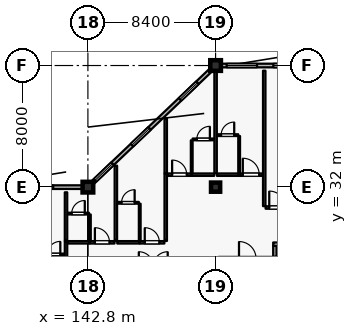
"""IFC4 building model, lengths in metres.
Left out: names, types, materials, properties, quantities, classifications, styles, units other than length and angle.
Written with IfcOpenShell. Run it as: python <this file> out.ifc"""

import sys

from ifc_helpers import new_model, si_unit, direction, frame, frame_2d, origin, origin_2d, place, context, subcontext, project, spatial, rectangle, extrude, element, fill, save


model = new_model("IFC4")
c1 = context("Model", 3, precision=1e-05, world=origin(), true_north=direction((0.0, 1.0)))
c2 = subcontext(c1, "Body", "Model", "MODEL_VIEW")
j1 = project(units=[si_unit("LENGTHUNIT", "METRE"), si_unit("PLANEANGLEUNIT", "RADIAN")], contexts=[c1])
p1 = place(None, origin())
s1 = spatial("IfcSite", under=j1, at=p1, CompositionType="ELEMENT")
p2 = place(p1, origin())
s2 = spatial("IfcBuilding", under=s1, at=p2, CompositionType="ELEMENT")
p3 = place(p2, frame((0.0, 0.0, 36.0)))
s3 = spatial("IfcBuildingStorey", under=s2, at=p3, CompositionType="ELEMENT", Elevation=36.0)
for number, where, z_axis, x_axis in (
    (1, (142.8, 32.0, 0.0), (0.0, 0.0, 1.0), (1.0, 0.0, 0.0)),
    (2, (151.2, 40.0, 0.0), (0.0, 0.0, 1.0), (1.0, 0.0, 0.0)),
):
    element("IfcColumn", number, at=place(p3, frame(where, z_axis=z_axis, x_axis=x_axis)), inside=s3, PredefinedType="COLUMN", context=c2, shape_type="SweptSolid", body=[
        extrude(rectangle(XDim=0.7, YDim=0.7, at=origin_2d()), origin(), (0.0, 0.0, 1.0), 3.6),
    ])
p4 = place(p3, frame((151.2, 32.0, 0.0), z_axis=(0.0, 0.0, 1.0), x_axis=(1.0, 0.0, 0.0)))
e3 = element("IfcColumn", 3, at=p4, inside=s3, PredefinedType="COLUMN", context=c2, shape_type="SweptSolid", body=[
    extrude(rectangle(XDim=0.6, YDim=0.6, at=origin_2d()), origin(), (0.0, 0.0, 1.0), 3.6),
])
p5 = place(p3, frame((134.75, 32.0, 0.0), z_axis=(0.0, 0.0, 1.0), x_axis=(1.0, 0.0, 0.0)))
e4 = element("IfcWall", 4, at=p5, inside=s3, PredefinedType="SOLIDWALL", context=c2, shape_type="SweptSolid", body=[
    extrude(rectangle(XDim=7.7, YDim=0.24, at=frame_2d((3.85, 0.0))), origin(), (0.0, 0.0, 1.0), 2.94),
])
p6 = place(p5, frame((0.89, 0.0, 0.8)))
e5 = element("IfcOpeningElement", 5, at=p6, cuts=e4, PredefinedType="OPENING", context=c2, shape_type="SweptSolid", body=[
    extrude(rectangle(XDim=1.6, YDim=1.6, at=frame_2d((0.8, 0.8))), frame((0.0, 0.13, 0.0), z_axis=(0.0, -1.0, 0.0), x_axis=(1.0, 0.0, 0.0)), (0.0, 0.0, 1.0), 0.26),
])
p7 = place(p5, frame((4.17, 0.0, 0.8)))
e6 = element("IfcOpeningElement", 6, at=p7, cuts=e4, PredefinedType="OPENING", context=c2, shape_type="SweptSolid", body=[
    extrude(rectangle(XDim=1.6, YDim=1.6, at=frame_2d((0.8, 0.8))), frame((0.0, 0.13, 0.0), z_axis=(0.0, -1.0, 0.0), x_axis=(1.0, 0.0, 0.0)), (0.0, 0.0, 1.0), 0.26),
])
p8 = place(p3, frame((143.15, 32.333, 0.0), z_axis=(0.0, 0.0, 1.0), x_axis=(0.724116091282, 0.689678103427, 0.0)))
e7 = element("IfcWall", 7, at=p8, inside=s3, PredefinedType="SOLIDWALL", context=c2, shape_type="SweptSolid", body=[
    extrude(rectangle(XDim=10.634, YDim=0.24, at=frame_2d((5.317, 0.0))), origin(), (0.0, 0.0, 1.0), 2.94),
])
p9 = place(p8, frame((0.16, 0.0, 0.8)))
e8 = element("IfcOpeningElement", 8, at=p9, cuts=e7, PredefinedType="OPENING", context=c2, shape_type="SweptSolid", body=[
    extrude(rectangle(XDim=1.6, YDim=1.6, at=frame_2d((0.8, 0.8))), frame((0.0, 0.13, 0.0), z_axis=(0.0, -1.0, 0.0), x_axis=(1.0, 0.0, 0.0)), (0.0, 0.0, 1.0), 0.26),
])
p10 = place(p8, frame((3.523, 0.0, 0.8)))
e9 = element("IfcOpeningElement", 9, at=p10, cuts=e7, PredefinedType="OPENING", context=c2, shape_type="SweptSolid", body=[
    extrude(rectangle(XDim=1.6, YDim=1.6, at=frame_2d((0.8, 0.8))), frame((0.0, 0.13, 0.0), z_axis=(0.0, -1.0, 0.0), x_axis=(1.0, 0.0, 0.0)), (0.0, 0.0, 1.0), 0.26),
])
p11 = place(p8, frame((7.88, 0.0, 0.8)))
e10 = element("IfcOpeningElement", 10, at=p11, cuts=e7, PredefinedType="OPENING", context=c2, shape_type="SweptSolid", body=[
    extrude(rectangle(XDim=1.6, YDim=1.6, at=frame_2d((0.8, 0.8))), frame((0.0, 0.13, 0.0), z_axis=(0.0, -1.0, 0.0), x_axis=(1.0, 0.0, 0.0)), (0.0, 0.0, 1.0), 0.26),
])
p12 = place(p3, frame((151.55, 40.0, 0.0), z_axis=(0.0, 0.0, 1.0), x_axis=(1.0, 0.0, 0.0)))
e11 = element("IfcWall", 11, at=p12, inside=s3, PredefinedType="SOLIDWALL", context=c2, shape_type="SweptSolid", body=[
    extrude(rectangle(XDim=7.7, YDim=0.24, at=frame_2d((3.85, 0.0))), origin(), (0.0, 0.0, 1.0), 2.94),
])
p13 = place(p12, frame((0.375, 0.0, 0.8)))
e12 = element("IfcOpeningElement", 12, at=p13, cuts=e11, PredefinedType="OPENING", context=c2, shape_type="SweptSolid", body=[
    extrude(rectangle(XDim=2.0, YDim=1.75, at=frame_2d((1.0, 0.875))), frame((0.0, 0.13, 0.0), z_axis=(0.0, -1.0, 0.0), x_axis=(1.0, 0.0, 0.0)), (0.0, 0.0, 1.0), 0.26),
])
p14 = place(p12, frame((3.45, 0.0, 0.8)))
e13 = element("IfcOpeningElement", 13, at=p14, cuts=e11, PredefinedType="OPENING", context=c2, shape_type="SweptSolid", body=[
    extrude(rectangle(XDim=2.0, YDim=1.75, at=frame_2d((1.0, 0.875))), frame((0.0, 0.13, 0.0), z_axis=(0.0, -1.0, 0.0), x_axis=(1.0, 0.0, 0.0)), (0.0, 0.0, 1.0), 0.26),
])
p15 = place(p12, frame((6.325, 0.0, 0.8)))
e14 = element("IfcOpeningElement", 14, at=p15, cuts=e11, PredefinedType="OPENING", context=c2, shape_type="SweptSolid", body=[
    extrude(rectangle(XDim=1.2, YDim=1.5, at=frame_2d((0.6, 0.75))), frame((0.0, 0.13, 0.0), z_axis=(0.0, -1.0, 0.0), x_axis=(1.0, 0.0, 0.0)), (0.0, 0.0, 1.0), 0.26),
])
p16 = place(p3, frame((155.1, 27.415, 0.0), z_axis=(0.0, 0.0, 1.0), x_axis=(0.0, 1.0, 0.0)))
e15 = element("IfcWall", 15, at=p16, inside=s3, PredefinedType="PARTITIONING", context=c2, shape_type="SweptSolid", body=[
    extrude(rectangle(XDim=0.72, YDim=0.22, at=frame_2d((0.36, 0.0))), origin(), (0.0, 0.0, 1.0), 3.365),
])
p17 = place(p3, frame((154.99, 28.25, 0.0), z_axis=(0.0, 0.0, 1.0), x_axis=(1.0, 0.0, 0.0)))
e16 = element("IfcWall", 16, at=p17, inside=s3, PredefinedType="PARTITIONING", context=c2, shape_type="SweptSolid", body=[
    extrude(rectangle(XDim=4.02, YDim=0.22, at=frame_2d((2.01, 0.0))), origin(), (0.0, 0.0, 1.0), 3.365),
])
p18 = place(p17, frame((1.39, 0.0, 0.0)))
e17 = element("IfcOpeningElement", 17, at=p18, cuts=e16, PredefinedType="OPENING", context=c2, shape_type="SweptSolid", body=[
    extrude(rectangle(XDim=1.24, YDim=2.2, at=frame_2d((0.62, 1.1))), frame((0.0, 0.12, 0.0), z_axis=(0.0, -1.0, 0.0), x_axis=(1.0, 0.0, 0.0)), (0.0, 0.0, 1.0), 0.24),
])
p19 = place(p3, frame((139.85, 27.57, 0.0), z_axis=(0.0, 0.0, 1.0), x_axis=(1.0, 0.0, 0.0)))
e18 = element("IfcWall", 18, at=p19, inside=s3, PredefinedType="PARTITIONING", context=c2, shape_type="SweptSolid", body=[
    extrude(rectangle(XDim=1.41, YDim=0.115, at=frame_2d((0.705, 0.0))), origin(), (0.0, 0.0, 1.0), 3.365),
])
p20 = place(p19, frame((0.275, 0.0, 0.0)))
e19 = element("IfcOpeningElement", 19, at=p20, cuts=e18, PredefinedType="OPENING", context=c2, shape_type="SweptSolid", body=[
    extrude(rectangle(XDim=0.86, YDim=2.12, at=frame_2d((0.43, 1.06))), frame((0.0, 0.067, 0.0), z_axis=(0.0, -1.0, 0.0), x_axis=(1.0, 0.0, 0.0)), (0.0, 0.0, 1.0), 0.135),
])
p21 = place(p3, frame((141.36, 25.06, 0.0), z_axis=(0.0, 0.0, 1.0), x_axis=(0.0, 1.0, 0.0)))
e20 = element("IfcWall", 20, at=p21, inside=s3, PredefinedType="PARTITIONING", context=c2, shape_type="SweptSolid", body=[
    extrude(rectangle(XDim=3.39, YDim=0.16, at=frame_2d((1.695, 0.0))), origin(), (0.0, 0.0, 1.0), 3.365),
])
p22 = place(p3, frame((141.45, 28.37, 0.0), z_axis=(0.0, 0.0, 1.0), x_axis=(1.0, 0.0, 0.0)))
e21 = element("IfcWall", 21, at=p22, inside=s3, PredefinedType="PARTITIONING", context=c2, shape_type="SweptSolid", body=[
    extrude(rectangle(XDim=1.47, YDim=0.16, at=frame_2d((0.735, 0.0))), origin(), (0.0, 0.0, 1.0), 3.365),
])
p23 = place(p3, frame((142.93, 28.37, 0.0), z_axis=(0.0, 0.0, 1.0), x_axis=(1.0, 0.0, 0.0)))
e22 = element("IfcWall", 22, at=p23, inside=s3, PredefinedType="PARTITIONING", context=c2, shape_type="SweptSolid", body=[
    extrude(rectangle(XDim=1.62, YDim=0.16, at=frame_2d((0.81, 0.0))), origin(), (0.0, 0.0, 1.0), 3.365),
])
p24 = place(p23, frame((0.33, 0.0, 0.0)))
e23 = element("IfcOpeningElement", 23, at=p24, cuts=e22, PredefinedType="OPENING", context=c2, shape_type="SweptSolid", body=[
    extrude(rectangle(XDim=0.96, YDim=2.2, at=frame_2d((0.48, 1.1))), frame((0.0, 0.09, 0.0), z_axis=(0.0, -1.0, 0.0), x_axis=(1.0, 0.0, 0.0)), (0.0, 0.0, 1.0), 0.18),
])
p25 = place(p3, frame((142.93, 28.46, 0.0), z_axis=(0.0, 0.0, 1.0), x_axis=(0.0, 1.0, 0.0)))
e24 = element("IfcWall", 24, at=p25, inside=s3, PredefinedType="PARTITIONING", context=c2, shape_type="SweptSolid", body=[
    extrude(rectangle(XDim=1.74, YDim=0.115, at=frame_2d((0.87, 0.0))), origin(), (0.0, 0.0, 1.0), 2.74),
])
p26 = place(p3, frame((141.46, 30.26, 0.0), z_axis=(0.0, 0.0, 1.0), x_axis=(1.0, 0.0, 0.0)))
e25 = element("IfcWall", 25, at=p26, inside=s3, PredefinedType="PARTITIONING", context=c2, shape_type="SweptSolid", body=[
    extrude(rectangle(XDim=1.41, YDim=0.115, at=frame_2d((0.705, 0.0))), origin(), (0.0, 0.0, 1.0), 3.365),
])
p27 = place(p26, frame((0.275, 0.0, 0.0)))
e26 = element("IfcOpeningElement", 26, at=p27, cuts=e25, PredefinedType="OPENING", context=c2, shape_type="SweptSolid", body=[
    extrude(rectangle(XDim=0.86, YDim=2.12, at=frame_2d((0.43, 1.06))), frame((0.0, 0.067, 0.0), z_axis=(0.0, -1.0, 0.0), x_axis=(1.0, 0.0, 0.0)), (0.0, 0.0, 1.0), 0.135),
])
p28 = place(p3, frame((141.36, 28.46, 0.0), z_axis=(0.0, 0.0, 1.0), x_axis=(0.0, 1.0, 0.0)))
e27 = element("IfcWall", 27, at=p28, inside=s3, PredefinedType="PARTITIONING", context=c2, shape_type="SweptSolid", body=[
    extrude(rectangle(XDim=3.2, YDim=0.16, at=frame_2d((1.6, 0.0))), origin(), (0.0, 0.0, 1.0), 3.365),
])
p29 = place(p3, frame((144.73, 28.37, 0.0), z_axis=(0.0, 0.0, 1.0), x_axis=(1.0, 0.0, 0.0)))
e28 = element("IfcWall", 28, at=p29, inside=s3, PredefinedType="PARTITIONING", context=c2, shape_type="SweptSolid", body=[
    extrude(rectangle(XDim=1.47, YDim=0.16, at=frame_2d((0.735, 0.0))), origin(), (0.0, 0.0, 1.0), 3.365),
])
p30 = place(p3, frame((146.21, 28.37, 0.0), z_axis=(0.0, 0.0, 1.0), x_axis=(1.0, 0.0, 0.0)))
e29 = element("IfcWall", 29, at=p30, inside=s3, PredefinedType="PARTITIONING", context=c2, shape_type="SweptSolid", body=[
    extrude(rectangle(XDim=1.62, YDim=0.16, at=frame_2d((0.81, 0.0))), origin(), (0.0, 0.0, 1.0), 3.365),
])
p31 = place(p30, frame((0.33, 0.0, 0.0)))
e30 = element("IfcOpeningElement", 30, at=p31, cuts=e29, PredefinedType="OPENING", context=c2, shape_type="SweptSolid", body=[
    extrude(rectangle(XDim=0.96, YDim=2.2, at=frame_2d((0.48, 1.1))), frame((0.0, 0.09, 0.0), z_axis=(0.0, -1.0, 0.0), x_axis=(1.0, 0.0, 0.0)), (0.0, 0.0, 1.0), 0.18),
])
p32 = place(p3, frame((146.21, 28.46, 0.0), z_axis=(0.0, 0.0, 1.0), x_axis=(0.0, 1.0, 0.0)))
e31 = element("IfcWall", 31, at=p32, inside=s3, PredefinedType="PARTITIONING", context=c2, shape_type="SweptSolid", body=[
    extrude(rectangle(XDim=2.45, YDim=0.115, at=frame_2d((1.225, 0.0))), origin(), (0.0, 0.0, 1.0), 3.365),
])
p33 = place(p3, frame((144.74, 30.97, 0.0), z_axis=(0.0, 0.0, 1.0), x_axis=(1.0, 0.0, 0.0)))
e32 = element("IfcWall", 32, at=p33, inside=s3, PredefinedType="PARTITIONING", context=c2, shape_type="SweptSolid", body=[
    extrude(rectangle(XDim=1.41, YDim=0.115, at=frame_2d((0.705, 0.0))), origin(), (0.0, 0.0, 1.0), 3.365),
])
p34 = place(p33, frame((0.275, 0.0, 0.0)))
e33 = element("IfcOpeningElement", 33, at=p34, cuts=e32, PredefinedType="OPENING", context=c2, shape_type="SweptSolid", body=[
    extrude(rectangle(XDim=0.86, YDim=2.12, at=frame_2d((0.43, 1.06))), frame((0.0, 0.067, 0.0), z_axis=(0.0, -1.0, 0.0), x_axis=(1.0, 0.0, 0.0)), (0.0, 0.0, 1.0), 0.135),
])
p35 = place(p3, frame((144.64, 28.46, 0.0), z_axis=(0.0, 0.0, 1.0), x_axis=(0.0, 1.0, 0.0)))
e34 = element("IfcWall", 34, at=p35, inside=s3, PredefinedType="PARTITIONING", context=c2, shape_type="SweptSolid", body=[
    extrude(rectangle(XDim=4.95, YDim=0.16, at=frame_2d((2.475, 0.0))), origin(), (0.0, 0.0, 1.0), 3.365),
])
p36 = place(p3, frame((147.92, 28.46, 0.0), z_axis=(0.0, 0.0, 1.0), x_axis=(0.0, 1.0, 0.0)))
e35 = element("IfcWall", 35, at=p36, inside=s3, PredefinedType="PARTITIONING", context=c2, shape_type="SweptSolid", body=[
    extrude(rectangle(XDim=4.44, YDim=0.16, at=frame_2d((2.22, 0.0))), origin(), (0.0, 0.0, 1.0), 3.365),
])
p37 = place(p3, frame((148.01, 32.82, 0.0), z_axis=(0.0, 0.0, 1.0), x_axis=(1.0, 0.0, 0.0)))
e36 = element("IfcWall", 36, at=p37, inside=s3, PredefinedType="PARTITIONING", context=c2, shape_type="SweptSolid", body=[
    extrude(rectangle(XDim=1.62, YDim=0.16, at=frame_2d((0.81, 0.0))), origin(), (0.0, 0.0, 1.0), 3.365),
])
p38 = place(p37, frame((0.33, 0.0, 0.0)))
e37 = element("IfcOpeningElement", 37, at=p38, cuts=e36, PredefinedType="OPENING", context=c2, shape_type="SweptSolid", body=[
    extrude(rectangle(XDim=0.96, YDim=2.2, at=frame_2d((0.48, 1.1))), frame((0.0, 0.09, 0.0), z_axis=(0.0, -1.0, 0.0), x_axis=(1.0, 0.0, 0.0)), (0.0, 0.0, 1.0), 0.18),
])
p39 = place(p3, frame((149.64, 32.82, 0.0), z_axis=(0.0, 0.0, 1.0), x_axis=(1.0, 0.0, 0.0)))
e38 = element("IfcWall", 38, at=p39, inside=s3, PredefinedType="PARTITIONING", context=c2, shape_type="SweptSolid", body=[
    extrude(rectangle(XDim=1.47, YDim=0.16, at=frame_2d((0.735, 0.0))), origin(), (0.0, 0.0, 1.0), 3.365),
])
p40 = place(p3, frame((149.63, 32.91, 0.0), z_axis=(0.0, 0.0, 1.0), x_axis=(0.0, 1.0, 0.0)))
e39 = element("IfcWall", 39, at=p40, inside=s3, PredefinedType="PARTITIONING", context=c2, shape_type="SweptSolid", body=[
    extrude(rectangle(XDim=2.17, YDim=0.115, at=frame_2d((1.085, 0.0))), origin(), (0.0, 0.0, 1.0), 3.365),
])
p41 = place(p3, frame((149.69, 35.14, 0.0), z_axis=(0.0, 0.0, 1.0), x_axis=(1.0, 0.0, 0.0)))
e40 = element("IfcWall", 40, at=p41, inside=s3, PredefinedType="PARTITIONING", context=c2, shape_type="SweptSolid", body=[
    extrude(rectangle(XDim=1.41, YDim=0.115, at=frame_2d((0.705, 0.0))), origin(), (0.0, 0.0, 1.0), 3.365),
])
p42 = place(p41, frame((0.275, 0.0, 0.0)))
e41 = element("IfcOpeningElement", 41, at=p42, cuts=e40, PredefinedType="OPENING", context=c2, shape_type="SweptSolid", body=[
    extrude(rectangle(XDim=0.86, YDim=2.12, at=frame_2d((0.43, 1.06))), frame((0.0, 0.067, 0.0), z_axis=(0.0, -1.0, 0.0), x_axis=(1.0, 0.0, 0.0)), (0.0, 0.0, 1.0), 0.135),
])
p43 = place(p3, frame((147.92, 32.91, 0.0), z_axis=(0.0, 0.0, 1.0), x_axis=(0.0, 1.0, 0.0)))
e42 = element("IfcWall", 42, at=p43, inside=s3, PredefinedType="PARTITIONING", context=c2, shape_type="SweptSolid", body=[
    extrude(rectangle(XDim=3.63, YDim=0.16, at=frame_2d((1.815, 0.0))), origin(), (0.0, 0.0, 1.0), 3.365),
])
p44 = place(p3, frame((151.29, 32.82, 0.0), z_axis=(0.0, 0.0, 1.0), x_axis=(1.0, 0.0, 0.0)))
e43 = element("IfcWall", 43, at=p44, inside=s3, PredefinedType="PARTITIONING", context=c2, shape_type="SweptSolid", body=[
    extrude(rectangle(XDim=1.45, YDim=0.16, at=frame_2d((0.725, 0.0))), origin(), (0.0, 0.0, 1.0), 3.365),
])
p45 = place(p3, frame((152.75, 32.82, 0.0), z_axis=(0.0, 0.0, 1.0), x_axis=(1.0, 0.0, 0.0)))
e44 = element("IfcWall", 44, at=p45, inside=s3, PredefinedType="PARTITIONING", context=c2, shape_type="SweptSolid", body=[
    extrude(rectangle(XDim=1.56, YDim=0.16, at=frame_2d((0.78, 0.0))), origin(), (0.0, 0.0, 1.0), 3.365),
])
p46 = place(p45, frame((0.24, 0.0, 0.0)))
e45 = element("IfcOpeningElement", 45, at=p46, cuts=e44, PredefinedType="OPENING", context=c2, shape_type="SweptSolid", body=[
    extrude(rectangle(XDim=1.08, YDim=2.3, at=frame_2d((0.54, 1.15))), frame((0.0, 0.09, 0.0), z_axis=(0.0, -1.0, 0.0), x_axis=(1.0, 0.0, 0.0)), (0.0, 0.0, 1.0), 0.18),
])
p47 = place(p3, frame((152.75, 32.91, 0.0), z_axis=(0.0, 0.0, 1.0), x_axis=(0.0, 1.0, 0.0)))
e46 = element("IfcWall", 46, at=p47, inside=s3, PredefinedType="PARTITIONING", context=c2, shape_type="SweptSolid", body=[
    extrude(rectangle(XDim=2.45, YDim=0.115, at=frame_2d((1.225, 0.0))), origin(), (0.0, 0.0, 1.0), 3.365),
])
p48 = place(p3, frame((151.3, 35.42, 0.0), z_axis=(0.0, 0.0, 1.0), x_axis=(1.0, 0.0, 0.0)))
e47 = element("IfcWall", 47, at=p48, inside=s3, PredefinedType="PARTITIONING", context=c2, shape_type="SweptSolid", body=[
    extrude(rectangle(XDim=1.39, YDim=0.115, at=frame_2d((0.695, 0.0))), origin(), (0.0, 0.0, 1.0), 3.365),
])
p49 = place(p48, frame((0.265, 0.0, 0.0)))
e48 = element("IfcOpeningElement", 48, at=p49, cuts=e47, PredefinedType="OPENING", context=c2, shape_type="SweptSolid", body=[
    extrude(rectangle(XDim=0.86, YDim=2.12, at=frame_2d((0.43, 1.06))), frame((0.0, 0.067, 0.0), z_axis=(0.0, -1.0, 0.0), x_axis=(1.0, 0.0, 0.0)), (0.0, 0.0, 1.0), 0.135),
])
p50 = place(p3, frame((151.2, 32.91, 0.0), z_axis=(0.0, 0.0, 1.0), x_axis=(0.0, 1.0, 0.0)))
e49 = element("IfcWall", 49, at=p50, inside=s3, PredefinedType="PARTITIONING", context=c2, shape_type="SweptSolid", body=[
    extrude(rectangle(XDim=6.75, YDim=0.16, at=frame_2d((3.375, 0.0))), origin(), (0.0, 0.0, 1.0), 2.74),
])
p51 = place(p3, frame((154.49, 30.66, 0.0), z_axis=(0.0, 0.0, 1.0), x_axis=(1.0, 0.0, 0.0)))
e50 = element("IfcWall", 50, at=p51, inside=s3, PredefinedType="PARTITIONING", context=c2, shape_type="SweptSolid", body=[
    extrude(rectangle(XDim=1.56, YDim=0.16, at=frame_2d((0.78, 0.0))), origin(), (0.0, 0.0, 1.0), 3.365),
])
p52 = place(p51, frame((0.24, 0.0, 0.0)))
e51 = element("IfcOpeningElement", 51, at=p52, cuts=e50, PredefinedType="OPENING", context=c2, shape_type="SweptSolid", body=[
    extrude(rectangle(XDim=1.08, YDim=2.3, at=frame_2d((0.54, 1.15))), frame((0.0, 0.09, 0.0), z_axis=(0.0, -1.0, 0.0), x_axis=(1.0, 0.0, 0.0)), (0.0, 0.0, 1.0), 0.18),
])
p53 = place(p3, frame((154.4, 30.75, 0.0), z_axis=(0.0, 0.0, 1.0), x_axis=(0.0, 1.0, 0.0)))
e52 = element("IfcWall", 52, at=p53, inside=s3, PredefinedType="PARTITIONING", context=c2, shape_type="SweptSolid", body=[
    extrude(rectangle(XDim=8.91, YDim=0.16, at=frame_2d((4.455, 0.0))), origin(), (0.0, 0.0, 1.0), 3.365),
])
p54 = place(p7, origin())
e53 = element("IfcWindow", 53, at=p54, inside=s3, PartitioningType="SINGLE_PANEL", PredefinedType="WINDOW", context=c2, shape_type="SweptSolid", body=[
    extrude(rectangle(XDim=1.6, YDim=1.6, at=frame_2d((0.8, 0.8))), frame((0.0, 0.03, 0.0), z_axis=(0.0, -1.0, 0.0), x_axis=(1.0, 0.0, 0.0)), (0.0, 0.0, 1.0), 0.06),
])
fill(e6, e53)
p55 = place(p9, origin())
e54 = element("IfcWindow", 54, at=p55, inside=s3, PartitioningType="SINGLE_PANEL", PredefinedType="WINDOW", context=c2, shape_type="SweptSolid", body=[
    extrude(rectangle(XDim=1.6, YDim=1.6, at=frame_2d((0.8, 0.8))), frame((0.0, 0.03, 0.0), z_axis=(0.0, -1.0, 0.0), x_axis=(1.0, 0.0, 0.0)), (0.0, 0.0, 1.0), 0.06),
])
fill(e8, e54)
p56 = place(p10, origin())
e55 = element("IfcWindow", 55, at=p56, inside=s3, PartitioningType="SINGLE_PANEL", PredefinedType="WINDOW", context=c2, shape_type="SweptSolid", body=[
    extrude(rectangle(XDim=1.6, YDim=1.6, at=frame_2d((0.8, 0.8))), frame((0.0, 0.03, 0.0), z_axis=(0.0, -1.0, 0.0), x_axis=(1.0, 0.0, 0.0)), (0.0, 0.0, 1.0), 0.06),
])
fill(e9, e55)
p57 = place(p11, origin())
e56 = element("IfcWindow", 56, at=p57, inside=s3, PartitioningType="SINGLE_PANEL", PredefinedType="WINDOW", context=c2, shape_type="SweptSolid", body=[
    extrude(rectangle(XDim=1.6, YDim=1.6, at=frame_2d((0.8, 0.8))), frame((0.0, 0.03, 0.0), z_axis=(0.0, -1.0, 0.0), x_axis=(1.0, 0.0, 0.0)), (0.0, 0.0, 1.0), 0.06),
])
fill(e10, e56)
p58 = place(p13, origin())
e57 = element("IfcWindow", 57, at=p58, inside=s3, PartitioningType="DOUBLE_PANEL_VERTICAL", PredefinedType="WINDOW", context=c2, shape_type="SweptSolid", body=[
    extrude(rectangle(XDim=2.0, YDim=1.75, at=frame_2d((1.0, 0.875))), frame((0.0, 0.03, 0.0), z_axis=(0.0, -1.0, 0.0), x_axis=(1.0, 0.0, 0.0)), (0.0, 0.0, 1.0), 0.06),
])
fill(e12, e57)
p59 = place(p14, origin())
e58 = element("IfcWindow", 58, at=p59, inside=s3, PartitioningType="DOUBLE_PANEL_VERTICAL", PredefinedType="WINDOW", context=c2, shape_type="SweptSolid", body=[
    extrude(rectangle(XDim=2.0, YDim=1.75, at=frame_2d((1.0, 0.875))), frame((0.0, 0.03, 0.0), z_axis=(0.0, -1.0, 0.0), x_axis=(1.0, 0.0, 0.0)), (0.0, 0.0, 1.0), 0.06),
])
fill(e13, e58)
p60 = place(p20, origin())
e59 = element("IfcDoor", 59, at=p60, inside=s3, OperationType="SINGLE_SWING_RIGHT", PredefinedType="DOOR", context=c2, shape_type="SweptSolid", body=[
    extrude(rectangle(XDim=0.86, YDim=2.12, at=frame_2d((0.43, 1.06))), frame((0.0, 0.025, 0.0), z_axis=(0.0, -1.0, 0.0), x_axis=(1.0, 0.0, 0.0)), (0.0, 0.0, 1.0), 0.05),
])
fill(e19, e59)
p61 = place(p24, origin())
e60 = element("IfcDoor", 60, at=p61, inside=s3, OperationType="SINGLE_SWING_LEFT", PredefinedType="DOOR", context=c2, shape_type="SweptSolid", body=[
    extrude(rectangle(XDim=0.96, YDim=2.2, at=frame_2d((0.48, 1.1))), frame((0.0, 0.025, 0.0), z_axis=(0.0, -1.0, 0.0), x_axis=(1.0, 0.0, 0.0)), (0.0, 0.0, 1.0), 0.05),
])
fill(e23, e60)
p62 = place(p27, origin())
e61 = element("IfcDoor", 61, at=p62, inside=s3, OperationType="SINGLE_SWING_RIGHT", PredefinedType="DOOR", context=c2, shape_type="SweptSolid", body=[
    extrude(rectangle(XDim=0.86, YDim=2.12, at=frame_2d((0.43, 1.06))), frame((0.0, 0.025, 0.0), z_axis=(0.0, -1.0, 0.0), x_axis=(1.0, 0.0, 0.0)), (0.0, 0.0, 1.0), 0.05),
])
fill(e26, e61)
p63 = place(p31, origin())
e62 = element("IfcDoor", 62, at=p63, inside=s3, OperationType="SINGLE_SWING_LEFT", PredefinedType="DOOR", context=c2, shape_type="SweptSolid", body=[
    extrude(rectangle(XDim=0.96, YDim=2.2, at=frame_2d((0.48, 1.1))), frame((0.0, 0.025, 0.0), z_axis=(0.0, -1.0, 0.0), x_axis=(1.0, 0.0, 0.0)), (0.0, 0.0, 1.0), 0.05),
])
fill(e30, e62)
p64 = place(p34, origin())
e63 = element("IfcDoor", 63, at=p64, inside=s3, OperationType="SINGLE_SWING_RIGHT", PredefinedType="DOOR", context=c2, shape_type="SweptSolid", body=[
    extrude(rectangle(XDim=0.86, YDim=2.12, at=frame_2d((0.43, 1.06))), frame((0.0, 0.025, 0.0), z_axis=(0.0, -1.0, 0.0), x_axis=(1.0, 0.0, 0.0)), (0.0, 0.0, 1.0), 0.05),
])
fill(e33, e63)
p65 = place(p38, origin())
e64 = element("IfcDoor", 64, at=p65, inside=s3, OperationType="SINGLE_SWING_LEFT", PredefinedType="DOOR", context=c2, shape_type="SweptSolid", body=[
    extrude(rectangle(XDim=0.96, YDim=2.2, at=frame_2d((0.48, 1.1))), frame((0.0, 0.025, 0.0), z_axis=(0.0, -1.0, 0.0), x_axis=(1.0, 0.0, 0.0)), (0.0, 0.0, 1.0), 0.05),
])
fill(e37, e64)
p66 = place(p42, origin())
e65 = element("IfcDoor", 65, at=p66, inside=s3, OperationType="SINGLE_SWING_RIGHT", PredefinedType="DOOR", context=c2, shape_type="SweptSolid", body=[
    extrude(rectangle(XDim=0.86, YDim=2.12, at=frame_2d((0.43, 1.06))), frame((0.0, 0.025, 0.0), z_axis=(0.0, -1.0, 0.0), x_axis=(1.0, 0.0, 0.0)), (0.0, 0.0, 1.0), 0.05),
])
fill(e41, e65)
p67 = place(p46, origin())
e66 = element("IfcDoor", 66, at=p67, inside=s3, OperationType="SINGLE_SWING_LEFT", PredefinedType="DOOR", context=c2, shape_type="SweptSolid", body=[
    extrude(rectangle(XDim=1.08, YDim=2.3, at=frame_2d((0.54, 1.15))), frame((0.0, 0.025, 0.0), z_axis=(0.0, -1.0, 0.0), x_axis=(1.0, 0.0, 0.0)), (0.0, 0.0, 1.0), 0.05),
])
fill(e45, e66)
p68 = place(p49, origin())
e67 = element("IfcDoor", 67, at=p68, inside=s3, OperationType="SINGLE_SWING_RIGHT", PredefinedType="DOOR", context=c2, shape_type="SweptSolid", body=[
    extrude(rectangle(XDim=0.86, YDim=2.12, at=frame_2d((0.43, 1.06))), frame((0.0, 0.025, 0.0), z_axis=(0.0, -1.0, 0.0), x_axis=(1.0, 0.0, 0.0)), (0.0, 0.0, 1.0), 0.05),
])
fill(e48, e67)
p69 = place(p52, origin())
e68 = element("IfcDoor", 68, at=p69, inside=s3, OperationType="SINGLE_SWING_LEFT", PredefinedType="DOOR", context=c2, shape_type="SweptSolid", body=[
    extrude(rectangle(XDim=1.08, YDim=2.3, at=frame_2d((0.54, 1.15))), frame((0.0, 0.025, 0.0), z_axis=(0.0, -1.0, 0.0), x_axis=(1.0, 0.0, 0.0)), (0.0, 0.0, 1.0), 0.05),
])
fill(e51, e68)
save(model, sys.argv[1])
